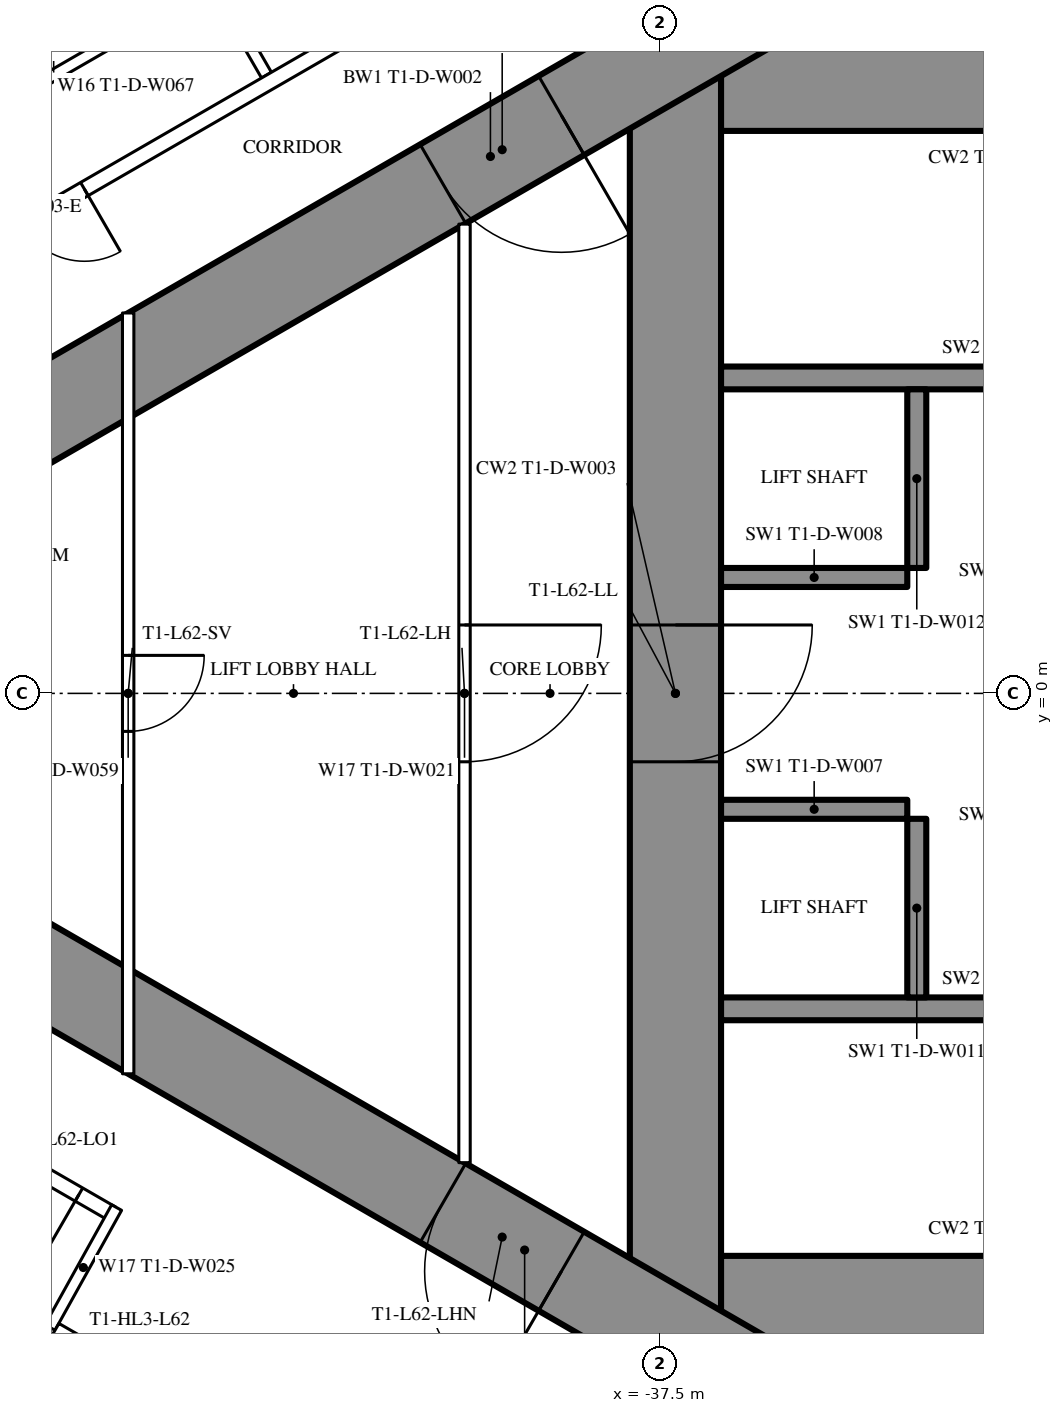
"""IFC4 building model, lengths in metres.
Left out: names, types, materials, properties, quantities, classifications, styles, units other than length and angle.
Written with IfcOpenShell. Run it as: python <this file> out.ifc"""

import sys

from ifc_helpers import new_model, si_unit, direction, frame, frame_2d, origin, place, context, subcontext, project, spatial, rectangle, extrude, element, fill, save


model = new_model("IFC4")
c1 = context("Model", 3, precision=1e-05, world=origin(), true_north=direction((0.0, 1.0)))
c2 = subcontext(c1, "Body", "Model", "MODEL_VIEW")
j1 = project(units=[si_unit("LENGTHUNIT", "METRE"), si_unit("PLANEANGLEUNIT", "RADIAN")], contexts=[c1])
p1 = place(None, origin())
s1 = spatial("IfcSite", under=j1, at=p1, CompositionType="ELEMENT")
p2 = place(p1, origin())
s2 = spatial("IfcBuilding", under=s1, at=p2, CompositionType="ELEMENT")
p3 = place(p2, frame((0.0, 0.0, 233.3)))
s3 = spatial("IfcBuildingStorey", under=s2, at=p3, CompositionType="ELEMENT", Elevation=233.3)
p4 = place(p3, frame((-37.3, 8.6, 0.0), z_axis=(0.0, 0.0, 1.0), x_axis=(0.0, -1.0, 0.0)))
e1 = element("IfcWall", 1, at=p4, inside=s3, PredefinedType="SHEAR", context=c2, shape_type="SweptSolid", body=[
    extrude(rectangle(XDim=17.2, YDim=1.2, at=frame_2d((8.6, 0.0))), origin(), (0.0, 0.0, 1.0), 3.6),
])
p5 = place(p4, frame((7.7, 0.0, 0.0)))
e2 = element("IfcOpeningElement", 2, at=p5, cuts=e1, PredefinedType="OPENING", context=c2, shape_type="SweptSolid", body=[
    extrude(rectangle(XDim=1.8, YDim=2.2, at=frame_2d((0.9, 1.1))), frame((0.0, 0.61, 0.0), z_axis=(0.0, -1.0, 0.0), x_axis=(1.0, 0.0, 0.0)), (0.0, 0.0, 1.0), 1.22),
])
p6 = place(p3, frame((-28.3, 8.0, 0.0), z_axis=(0.0, 0.0, 1.0), x_axis=(-1.0, 0.0, 0.0)))
e3 = element("IfcWall", 3, at=p6, inside=s3, PredefinedType="SHEAR", context=c2, shape_type="SweptSolid", body=[
    extrude(rectangle(XDim=8.4, YDim=1.2, at=frame_2d((4.2, 0.0))), origin(), (0.0, 0.0, 1.0), 3.6),
])
p7 = place(p6, frame((0.25, 0.0, 0.0)))
e4 = element("IfcOpeningElement", 4, at=p7, cuts=e3, PredefinedType="OPENING", context=c2, shape_type="SweptSolid", body=[
    extrude(rectangle(XDim=1.0, YDim=2.2, at=frame_2d((0.5, 1.1))), frame((0.0, 0.61, 0.0), z_axis=(0.0, -1.0, 0.0), x_axis=(1.0, 0.0, 0.0)), (0.0, 0.0, 1.0), 1.22),
])
p8 = place(p3, frame((-28.3, -8.0, 0.0), z_axis=(0.0, 0.0, 1.0), x_axis=(-1.0, 0.0, 0.0)))
e5 = element("IfcWall", 5, at=p8, inside=s3, PredefinedType="SHEAR", context=c2, shape_type="SweptSolid", body=[
    extrude(rectangle(XDim=8.4, YDim=1.2, at=frame_2d((4.2, 0.0))), origin(), (0.0, 0.0, 1.0), 3.6),
])
p9 = place(p8, frame((0.25, 0.0, 0.0)))
e6 = element("IfcOpeningElement", 6, at=p9, cuts=e5, PredefinedType="OPENING", context=c2, shape_type="SweptSolid", body=[
    extrude(rectangle(XDim=1.0, YDim=2.2, at=frame_2d((0.5, 1.1))), frame((0.0, 0.61, 0.0), z_axis=(0.0, -1.0, 0.0), x_axis=(1.0, 0.0, 0.0)), (0.0, 0.0, 1.0), 1.22),
])
for number, where, z_axis, x_axis in (
    (7, (-28.3, 4.15, 0.0), (0.0, 0.0, 1.0), (-1.0, 0.0, 0.0)),
    (8, (-28.3, -4.15, 0.0), (0.0, 0.0, 1.0), (-1.0, 0.0, 0.0)),
):
    element("IfcWall", number, at=place(p3, frame(where, z_axis=z_axis, x_axis=x_axis)), inside=s3, PredefinedType="SHEAR", context=c2, shape_type="SweptSolid", body=[
        extrude(rectangle(XDim=8.4, YDim=0.3, at=frame_2d((4.2, 0.0))), origin(), (0.0, 0.0, 1.0), 3.6),
    ])
p10 = place(p3, frame((-34.125, 4.0, 0.0), z_axis=(0.0, 0.0, 1.0), x_axis=(0.0, -1.0, 0.0)))
e9 = element("IfcWall", 9, at=p10, inside=s3, PredefinedType="SHEAR", context=c2, shape_type="SweptSolid", body=[
    extrude(rectangle(XDim=2.35, YDim=0.25, at=frame_2d((1.175, 0.0))), origin(), (0.0, 0.0, 1.0), 3.6),
])
p11 = place(p3, frame((-34.25, 1.525, 0.0), z_axis=(0.0, 0.0, 1.0), x_axis=(-1.0, 0.0, 0.0)))
e10 = element("IfcWall", 10, at=p11, inside=s3, PredefinedType="SHEAR", context=c2, shape_type="SweptSolid", body=[
    extrude(rectangle(XDim=2.45, YDim=0.25, at=frame_2d((1.225, 0.0))), origin(), (0.0, 0.0, 1.0), 3.6),
])
p12 = place(p3, frame((-34.125, -1.65, 0.0), z_axis=(0.0, 0.0, 1.0), x_axis=(0.0, -1.0, 0.0)))
e11 = element("IfcWall", 11, at=p12, inside=s3, PredefinedType="SHEAR", context=c2, shape_type="SweptSolid", body=[
    extrude(rectangle(XDim=2.35, YDim=0.25, at=frame_2d((1.175, 0.0))), origin(), (0.0, 0.0, 1.0), 3.6),
])
p13 = place(p3, frame((-34.25, -1.525, 0.0), z_axis=(0.0, 0.0, 1.0), x_axis=(-1.0, 0.0, 0.0)))
e12 = element("IfcWall", 12, at=p13, inside=s3, PredefinedType="SHEAR", context=c2, shape_type="SweptSolid", body=[
    extrude(rectangle(XDim=2.45, YDim=0.25, at=frame_2d((1.225, 0.0))), origin(), (0.0, 0.0, 1.0), 3.6),
])
p14 = place(p3, frame((-27.2, 14.3, 0.0), z_axis=(0.0, 0.0, 1.0), x_axis=(-0.866026593062, -0.499997940104, 0.0)))
e13 = element("IfcWall", 13, at=p14, inside=s3, PredefinedType="SHEAR", context=c2, shape_type="SweptSolid", body=[
    extrude(rectangle(XDim=28.946, YDim=1.2, at=frame_2d((14.473, 0.0))), origin(), (0.0, 0.0, 1.0), 3.6),
])
p15 = place(p14, frame((4.6, 0.0, 0.0)))
e14 = element("IfcOpeningElement", 14, at=p15, cuts=e13, PredefinedType="OPENING", context=c2, shape_type="SweptSolid", body=[
    extrude(rectangle(XDim=1.0, YDim=2.2, at=frame_2d((0.5, 1.1))), frame((0.0, 0.61, 0.0), z_axis=(0.0, -1.0, 0.0), x_axis=(1.0, 0.0, 0.0)), (0.0, 0.0, 1.0), 1.22),
])
p16 = place(p14, frame((13.395, 0.0, 0.0)))
e15 = element("IfcOpeningElement", 15, at=p16, cuts=e13, PredefinedType="OPENING", context=c2, shape_type="SweptSolid", body=[
    extrude(rectangle(XDim=1.8, YDim=2.2, at=frame_2d((0.9, 1.1))), frame((0.0, 0.61, 0.0), z_axis=(0.0, -1.0, 0.0), x_axis=(1.0, 0.0, 0.0)), (0.0, 0.0, 1.0), 1.22),
])
p17 = place(p3, frame((-27.2, -14.3, 0.0), z_axis=(0.0, 0.0, 1.0), x_axis=(-0.866024021859, 0.500002393557, 0.0)))
e16 = element("IfcWall", 16, at=p17, inside=s3, PredefinedType="SHEAR", context=c2, shape_type="SweptSolid", body=[
    extrude(rectangle(XDim=27.907, YDim=1.2, at=frame_2d((13.954, 0.0))), origin(), (0.0, 0.0, 1.0), 3.6),
])
p18 = place(p17, frame((4.6, 0.0, 0.0)))
e17 = element("IfcOpeningElement", 17, at=p18, cuts=e16, PredefinedType="OPENING", context=c2, shape_type="SweptSolid", body=[
    extrude(rectangle(XDim=1.0, YDim=2.2, at=frame_2d((0.5, 1.1))), frame((0.0, 0.61, 0.0), z_axis=(0.0, -1.0, 0.0), x_axis=(1.0, 0.0, 0.0)), (0.0, 0.0, 1.0), 1.22),
])
p19 = place(p17, frame((13.395, 0.0, 0.0)))
e18 = element("IfcOpeningElement", 18, at=p19, cuts=e16, PredefinedType="OPENING", context=c2, shape_type="SweptSolid", body=[
    extrude(rectangle(XDim=1.8, YDim=2.2, at=frame_2d((0.9, 1.1))), frame((0.0, 0.61, 0.0), z_axis=(0.0, -1.0, 0.0), x_axis=(1.0, 0.0, 0.0)), (0.0, 0.0, 1.0), 1.22),
])
p20 = place(p3, frame((-42.68, 8.134, 0.0), z_axis=(0.0, 0.0, 1.0), x_axis=(-0.499984479505, 0.866034364361, 0.0)))
e19 = element("IfcWall", 19, at=p20, inside=s3, PredefinedType="PARTITIONING", context=c2, shape_type="SweptSolid", body=[
    extrude(rectangle(XDim=5.995, YDim=0.15, at=frame_2d((2.998, 0.0))), origin(), (0.0, 0.0, 1.0), 2.45),
])
p21 = place(p3, frame((-44.715, -6.844, 0.0), z_axis=(0.0, 0.0, 1.0), x_axis=(-0.866025261224, 0.500000246922, 0.0)))
e20 = element("IfcWall", 20, at=p21, inside=s3, PredefinedType="PARTITIONING", context=c2, shape_type="SweptSolid", body=[
    extrude(rectangle(XDim=13.567, YDim=0.2, at=frame_2d((6.783, 0.0))), origin(), (0.0, 0.0, 1.0), 3.35),
])
p22 = place(p21, frame((6.266, 0.0, 0.0)))
e21 = element("IfcOpeningElement", 21, at=p22, cuts=e20, PredefinedType="OPENING", context=c2, shape_type="SweptSolid", body=[
    extrude(rectangle(XDim=0.95, YDim=2.2, at=frame_2d((0.475, 1.1))), frame((0.0, 0.11, 0.0), z_axis=(0.0, -1.0, 0.0), x_axis=(1.0, 0.0, 0.0)), (0.0, 0.0, 1.0), 0.22),
])
p23 = place(p21, frame((4.565, 0.0, 0.0)))
e22 = element("IfcOpeningElement", 22, at=p23, cuts=e20, PredefinedType="OPENING", context=c2, shape_type="SweptSolid", body=[
    extrude(rectangle(XDim=0.95, YDim=2.2, at=frame_2d((0.475, 1.1))), frame((0.0, 0.11, 0.0), z_axis=(0.0, -1.0, 0.0), x_axis=(1.0, 0.0, 0.0)), (0.0, 0.0, 1.0), 0.22),
])
p24 = place(p21, frame((0.5, 0.0, 0.0)))
e23 = element("IfcOpeningElement", 23, at=p24, cuts=e20, PredefinedType="OPENING", context=c2, shape_type="SweptSolid", body=[
    extrude(rectangle(XDim=0.967, YDim=2.2, at=frame_2d((0.483, 1.1))), frame((0.0, 0.11, 0.0), z_axis=(0.0, -1.0, 0.0), x_axis=(1.0, 0.0, 0.0)), (0.0, 0.0, 1.0), 0.22),
])
p25 = place(p3, frame((-44.652, -6.764, 0.0), z_axis=(0.0, 0.0, 1.0), x_axis=(-0.485424724123, -0.874278466629, 0.0)))
e24 = element("IfcWall", 24, at=p25, inside=s3, PredefinedType="PARTITIONING", context=c2, shape_type="SweptSolid", body=[
    extrude(rectangle(XDim=1.805, YDim=0.15, at=frame_2d((0.903, 0.0))), origin(), (0.0, 0.0, 1.0), 3.35),
])
p26 = place(p3, frame((-44.765, 8.546, 0.0), z_axis=(0.0, 0.0, 1.0), x_axis=(-0.86604923931, -0.499958713387, 0.0)))
e25 = element("IfcWall", 25, at=p26, inside=s3, PredefinedType="PARTITIONING", context=c2, shape_type="SweptSolid", body=[
    extrude(rectangle(XDim=2.475, YDim=0.15, at=frame_2d((1.237, 0.0))), origin(), (0.0, 0.0, 1.0), 3.35),
])
p27 = place(p3, frame((-28.737, 16.068, 0.0), z_axis=(0.0, 0.0, 1.0), x_axis=(-0.866023901326, -0.500002602325, 0.0)))
e26 = element("IfcWall", 26, at=p27, inside=s3, PredefinedType="PARTITIONING", context=c2, shape_type="SweptSolid", body=[
    extrude(rectangle(XDim=20.192, YDim=0.2, at=frame_2d((10.096, 0.0))), origin(), (0.0, 0.0, 1.0), 3.35),
])
p28 = place(p27, frame((1.08, 0.0, 0.0)))
e27 = element("IfcOpeningElement", 27, at=p28, cuts=e26, PredefinedType="OPENING", context=c2, shape_type="SweptSolid", body=[
    extrude(rectangle(XDim=1.8, YDim=2.03, at=frame_2d((0.9, 1.015))), frame((0.0, 0.11, 0.0), z_axis=(0.0, -1.0, 0.0), x_axis=(1.0, 0.0, 0.0)), (0.0, 0.0, 1.0), 0.22),
])
p29 = place(p27, frame((6.86, 0.0, 0.0)))
e28 = element("IfcOpeningElement", 28, at=p29, cuts=e26, PredefinedType="OPENING", context=c2, shape_type="SweptSolid", body=[
    extrude(rectangle(XDim=1.0, YDim=2.2, at=frame_2d((0.5, 1.1))), frame((0.0, 0.11, 0.0), z_axis=(0.0, -1.0, 0.0), x_axis=(1.0, 0.0, 0.0)), (0.0, 0.0, 1.0), 0.22),
])
p30 = place(p27, frame((18.867, 0.0, 0.0)))
e29 = element("IfcOpeningElement", 29, at=p30, cuts=e26, PredefinedType="OPENING", context=c2, shape_type="SweptSolid", body=[
    extrude(rectangle(XDim=0.95, YDim=2.2, at=frame_2d((0.475, 1.1))), frame((0.0, 0.11, 0.0), z_axis=(0.0, -1.0, 0.0), x_axis=(1.0, 0.0, 0.0)), (0.0, 0.0, 1.0), 0.22),
])
p31 = place(p3, frame((-40.075, 6.174, 0.0), z_axis=(0.0, 0.0, 1.0), x_axis=(0.0, -1.0, 0.0)))
e30 = element("IfcWall", 30, at=p31, inside=s3, PredefinedType="PARTITIONING", context=c2, shape_type="SweptSolid", body=[
    extrude(rectangle(XDim=12.348, YDim=0.15, at=frame_2d((6.174, 0.0))), origin(), (0.0, 0.0, 1.0), 3.35),
])
p32 = place(p31, frame((5.274, 0.0, 0.0)))
e31 = element("IfcOpeningElement", 31, at=p32, cuts=e30, PredefinedType="OPENING", context=c2, shape_type="SweptSolid", body=[
    extrude(rectangle(XDim=1.8, YDim=2.2, at=frame_2d((0.9, 1.1))), frame((0.0, 0.085, 0.0), z_axis=(0.0, -1.0, 0.0), x_axis=(1.0, 0.0, 0.0)), (0.0, 0.0, 1.0), 0.17),
])
p33 = place(p3, frame((-44.5, 5.005, 0.0), z_axis=(0.0, 0.0, 1.0), x_axis=(0.0, -1.0, 0.0)))
e32 = element("IfcWall", 32, at=p33, inside=s3, PredefinedType="PARTITIONING", context=c2, shape_type="SweptSolid", body=[
    extrude(rectangle(XDim=10.009, YDim=0.15, at=frame_2d((5.005, 0.0))), origin(), (0.0, 0.0, 1.0), 2.5),
])
p34 = place(p33, frame((4.505, 0.0, 0.0)))
e33 = element("IfcOpeningElement", 33, at=p34, cuts=e32, PredefinedType="OPENING", context=c2, shape_type="SweptSolid", body=[
    extrude(rectangle(XDim=1.0, YDim=2.2, at=frame_2d((0.5, 1.1))), frame((0.0, 0.085, 0.0), z_axis=(0.0, -1.0, 0.0), x_axis=(1.0, 0.0, 0.0)), (0.0, 0.0, 1.0), 0.17),
])
p35 = place(p3, frame((-39.758, -11.697, 0.0), z_axis=(0.0, 0.0, 1.0), x_axis=(-0.866024194504, 0.500002094529, 0.0)))
e34 = element("IfcWall", 34, at=p35, inside=s3, PredefinedType="PARTITIONING", context=c2, shape_type="SweptSolid", body=[
    extrude(rectangle(XDim=6.6, YDim=0.25, at=frame_2d((3.3, 0.0))), origin(), (0.0, 0.0, 1.0), 3.35),
])
p36 = place(p35, frame((0.75, 0.0, 0.0)))
e35 = element("IfcOpeningElement", 35, at=p36, cuts=e34, PredefinedType="OPENING", context=c2, shape_type="SweptSolid", body=[
    extrude(rectangle(XDim=1.1, YDim=2.2, at=frame_2d((0.55, 1.1))), frame((0.0, 0.135, 0.0), z_axis=(0.0, -1.0, 0.0), x_axis=(1.0, 0.0, 0.0)), (0.0, 0.0, 1.0), 0.27),
])
p37 = place(p35, frame((2.75, 0.0, 0.0)))
e36 = element("IfcOpeningElement", 36, at=p37, cuts=e34, PredefinedType="OPENING", context=c2, shape_type="SweptSolid", body=[
    extrude(rectangle(XDim=1.1, YDim=2.2, at=frame_2d((0.55, 1.1))), frame((0.0, 0.135, 0.0), z_axis=(0.0, -1.0, 0.0), x_axis=(1.0, 0.0, 0.0)), (0.0, 0.0, 1.0), 0.27),
])
p38 = place(p35, frame((4.75, 0.0, 0.0)))
e37 = element("IfcOpeningElement", 37, at=p38, cuts=e34, PredefinedType="OPENING", context=c2, shape_type="SweptSolid", body=[
    extrude(rectangle(XDim=1.1, YDim=2.2, at=frame_2d((0.55, 1.1))), frame((0.0, 0.135, 0.0), z_axis=(0.0, -1.0, 0.0), x_axis=(1.0, 0.0, 0.0)), (0.0, 0.0, 1.0), 0.27),
])
p39 = place(p30, origin())
e38 = element("IfcDoor", 38, at=p39, inside=s3, OperationType="SINGLE_SWING_LEFT", PredefinedType="DOOR", context=c2, shape_type="SweptSolid", body=[
    extrude(rectangle(XDim=0.95, YDim=2.2, at=frame_2d((0.475, 1.1))), frame((0.0, 0.025, 0.0), z_axis=(0.0, -1.0, 0.0), x_axis=(1.0, 0.0, 0.0)), (0.0, 0.0, 1.0), 0.05),
])
fill(e29, e38)
p40 = place(p24, origin())
e39 = element("IfcDoor", 39, at=p40, inside=s3, OperationType="SINGLE_SWING_LEFT", PredefinedType="DOOR", context=c2, shape_type="SweptSolid", body=[
    extrude(rectangle(XDim=0.967, YDim=2.2, at=frame_2d((0.483, 1.1))), frame((0.0, 0.025, 0.0), z_axis=(0.0, -1.0, 0.0), x_axis=(1.0, 0.0, 0.0)), (0.0, 0.0, 1.0), 0.05),
])
fill(e23, e39)
p41 = place(p32, origin())
e40 = element("IfcDoor", 40, at=p41, inside=s3, OperationType="DOUBLE_DOOR_SINGLE_SWING", PredefinedType="DOOR", context=c2, shape_type="SweptSolid", body=[
    extrude(rectangle(XDim=1.8, YDim=2.2, at=frame_2d((0.9, 1.1))), frame((0.0, 0.025, 0.0), z_axis=(0.0, -1.0, 0.0), x_axis=(1.0, 0.0, 0.0)), (0.0, 0.0, 1.0), 0.05),
])
fill(e31, e40)
p42 = place(p34, origin())
e41 = element("IfcDoor", 41, at=p42, inside=s3, OperationType="SINGLE_SWING_LEFT", PredefinedType="DOOR", context=c2, shape_type="SweptSolid", body=[
    extrude(rectangle(XDim=1.0, YDim=2.2, at=frame_2d((0.5, 1.1))), frame((0.0, 0.025, 0.0), z_axis=(0.0, -1.0, 0.0), x_axis=(1.0, 0.0, 0.0)), (0.0, 0.0, 1.0), 0.05),
])
fill(e33, e41)
p43 = place(p16, origin())
e42 = element("IfcDoor", 42, at=p43, inside=s3, OperationType="DOUBLE_DOOR_SINGLE_SWING", PredefinedType="DOOR", context=c2, shape_type="SweptSolid", body=[
    extrude(rectangle(XDim=1.8, YDim=2.2, at=frame_2d((0.9, 1.1))), frame((0.0, 0.025, 0.0), z_axis=(0.0, -1.0, 0.0), x_axis=(1.0, 0.0, 0.0)), (0.0, 0.0, 1.0), 0.05),
])
fill(e15, e42)
p44 = place(p19, origin())
e43 = element("IfcDoor", 43, at=p44, inside=s3, OperationType="DOUBLE_DOOR_SINGLE_SWING", PredefinedType="DOOR", context=c2, shape_type="SweptSolid", body=[
    extrude(rectangle(XDim=1.8, YDim=2.2, at=frame_2d((0.9, 1.1))), frame((0.0, 0.025, 0.0), z_axis=(0.0, -1.0, 0.0), x_axis=(1.0, 0.0, 0.0)), (0.0, 0.0, 1.0), 0.05),
])
fill(e18, e43)
p45 = place(p5, origin())
e44 = element("IfcDoor", 44, at=p45, inside=s3, OperationType="DOUBLE_DOOR_SINGLE_SWING", PredefinedType="DOOR", context=c2, shape_type="SweptSolid", body=[
    extrude(rectangle(XDim=1.8, YDim=2.2, at=frame_2d((0.9, 1.1))), frame((0.0, 0.025, 0.0), z_axis=(0.0, -1.0, 0.0), x_axis=(1.0, 0.0, 0.0)), (0.0, 0.0, 1.0), 0.05),
])
fill(e2, e44)
save(model, sys.argv[1])
